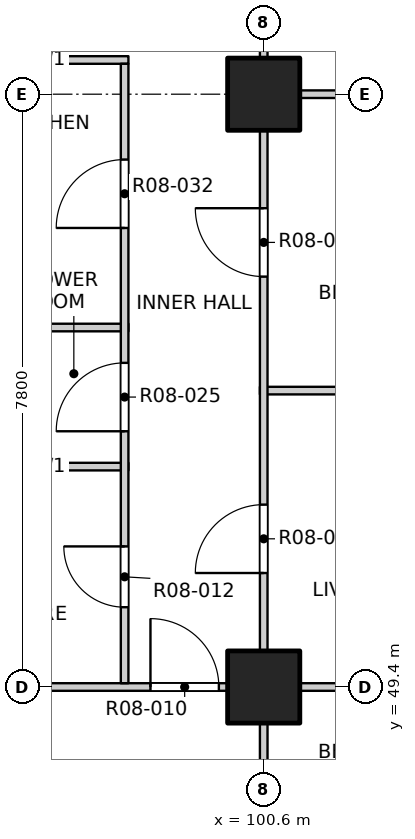
"""IFC4 building model, lengths in metres.
Left out: names, types, materials, properties, quantities, classifications, styles, units other than length and angle.
Written with IfcOpenShell. Run it as: python <this file> out.ifc"""

import sys

from ifc_helpers import new_model, si_unit, direction, frame, frame_2d, origin, origin_2d, place, context, subcontext, project, spatial, rectangle, extrude, element, fill, save


model = new_model("IFC4")
c1 = context("Model", 3, precision=1e-05, world=origin(), true_north=direction((0.0, 1.0)))
c2 = subcontext(c1, "Body", "Model", "MODEL_VIEW")
j1 = project(units=[si_unit("LENGTHUNIT", "METRE"), si_unit("PLANEANGLEUNIT", "RADIAN")], contexts=[c1])
p1 = place(None, origin())
s1 = spatial("IfcSite", under=j1, at=p1, CompositionType="ELEMENT")
p2 = place(p1, origin())
s2 = spatial("IfcBuilding", under=s1, at=p2, CompositionType="ELEMENT")
p3 = place(p2, frame((0.0, 0.0, 99.9)))
s3 = spatial("IfcBuildingStorey", under=s2, at=p3, CompositionType="ELEMENT", Elevation=99.9)
for number, where, z_axis, x_axis in (
    (1, (100.6, 49.4, -0.3), (0.0, 0.0, 1.0), (1.0, 0.0, 0.0)),
    (2, (100.6, 57.2, -0.3), (0.0, 0.0, 1.0), (1.0, 0.0, 0.0)),
):
    element("IfcColumn", number, at=place(p3, frame(where, z_axis=z_axis, x_axis=x_axis)), inside=s3, PredefinedType="COLUMN", context=c2, shape_type="SweptSolid", body=[
        extrude(rectangle(XDim=0.95, YDim=0.95, at=origin_2d()), origin(), (0.0, 0.0, 1.0), 3.45),
    ])
p4 = place(p3, frame((65.8, 49.4, 0.0), z_axis=(0.0, 0.0, 1.0), x_axis=(1.0, 0.0, 0.0)))
e3 = element("IfcWall", 3, at=p4, inside=s3, PredefinedType="PARTITIONING", context=c2, shape_type="SweptSolid", body=[
    extrude(rectangle(XDim=38.4, YDim=0.1, at=frame_2d((19.2, 0.0))), origin(), (0.0, 0.0, 1.0), 3.15),
])
p5 = place(p4, frame((4.19, 0.0, 0.0)))
e4 = element("IfcOpeningElement", 4, at=p5, cuts=e3, PredefinedType="OPENING", context=c2, shape_type="SweptSolid", body=[
    extrude(rectangle(XDim=0.9, YDim=2.1, at=frame_2d((0.45, 1.05))), frame((0.0, 0.06, 0.0), z_axis=(0.0, -1.0, 0.0), x_axis=(1.0, 0.0, 0.0)), (0.0, 0.0, 1.0), 0.12),
])
p6 = place(p4, frame((9.0, 0.0, 0.0)))
e5 = element("IfcOpeningElement", 5, at=p6, cuts=e3, PredefinedType="OPENING", context=c2, shape_type="SweptSolid", body=[
    extrude(rectangle(XDim=0.9, YDim=2.1, at=frame_2d((0.45, 1.05))), frame((0.0, 0.06, 0.0), z_axis=(0.0, -1.0, 0.0), x_axis=(1.0, 0.0, 0.0)), (0.0, 0.0, 1.0), 0.12),
])
p7 = place(p4, frame((12.9, 0.0, 0.0)))
e6 = element("IfcOpeningElement", 6, at=p7, cuts=e3, PredefinedType="OPENING", context=c2, shape_type="SweptSolid", body=[
    extrude(rectangle(XDim=0.9, YDim=2.1, at=frame_2d((0.45, 1.05))), frame((0.0, 0.06, 0.0), z_axis=(0.0, -1.0, 0.0), x_axis=(1.0, 0.0, 0.0)), (0.0, 0.0, 1.0), 0.12),
])
p8 = place(p4, frame((16.8, 0.0, 0.0)))
e7 = element("IfcOpeningElement", 7, at=p8, cuts=e3, PredefinedType="OPENING", context=c2, shape_type="SweptSolid", body=[
    extrude(rectangle(XDim=0.9, YDim=2.1, at=frame_2d((0.45, 1.05))), frame((0.0, 0.06, 0.0), z_axis=(0.0, -1.0, 0.0), x_axis=(1.0, 0.0, 0.0)), (0.0, 0.0, 1.0), 0.12),
])
p9 = place(p4, frame((20.7, 0.0, 0.0)))
e8 = element("IfcOpeningElement", 8, at=p9, cuts=e3, PredefinedType="OPENING", context=c2, shape_type="SweptSolid", body=[
    extrude(rectangle(XDim=0.9, YDim=2.1, at=frame_2d((0.45, 1.05))), frame((0.0, 0.06, 0.0), z_axis=(0.0, -1.0, 0.0), x_axis=(1.0, 0.0, 0.0)), (0.0, 0.0, 1.0), 0.12),
])
p10 = place(p4, frame((24.6, 0.0, 0.0)))
e9 = element("IfcOpeningElement", 9, at=p10, cuts=e3, PredefinedType="OPENING", context=c2, shape_type="SweptSolid", body=[
    extrude(rectangle(XDim=0.9, YDim=2.1, at=frame_2d((0.45, 1.05))), frame((0.0, 0.06, 0.0), z_axis=(0.0, -1.0, 0.0), x_axis=(1.0, 0.0, 0.0)), (0.0, 0.0, 1.0), 0.12),
])
p11 = place(p4, frame((28.5, 0.0, 0.0)))
e10 = element("IfcOpeningElement", 10, at=p11, cuts=e3, PredefinedType="OPENING", context=c2, shape_type="SweptSolid", body=[
    extrude(rectangle(XDim=0.9, YDim=2.1, at=frame_2d((0.45, 1.05))), frame((0.0, 0.06, 0.0), z_axis=(0.0, -1.0, 0.0), x_axis=(1.0, 0.0, 0.0)), (0.0, 0.0, 1.0), 0.12),
])
p12 = place(p4, frame((33.31, 0.0, 0.0)))
e11 = element("IfcOpeningElement", 11, at=p12, cuts=e3, PredefinedType="OPENING", context=c2, shape_type="SweptSolid", body=[
    extrude(rectangle(XDim=0.9, YDim=2.1, at=frame_2d((0.45, 1.05))), frame((0.0, 0.06, 0.0), z_axis=(0.0, -1.0, 0.0), x_axis=(1.0, 0.0, 0.0)), (0.0, 0.0, 1.0), 0.12),
])
p13 = place(p3, frame((96.6, 52.3, 0.0), z_axis=(0.0, 0.0, 1.0), x_axis=(1.0, 0.0, 0.0)))
e12 = element("IfcWall", 12, at=p13, inside=s3, PredefinedType="PARTITIONING", context=c2, shape_type="SweptSolid", body=[
    extrude(rectangle(XDim=2.22, YDim=0.1, at=frame_2d((1.11, 0.0))), origin(), (0.0, 0.0, 1.0), 3.15),
])
p14 = place(p3, frame((100.55, 53.3, 0.0), z_axis=(0.0, 0.0, 1.0), x_axis=(1.0, 0.0, 0.0)))
e13 = element("IfcWall", 13, at=p14, inside=s3, PredefinedType="PARTITIONING", context=c2, shape_type="SweptSolid", body=[
    extrude(rectangle(XDim=3.65, YDim=0.1, at=frame_2d((1.825, 0.0))), origin(), (0.0, 0.0, 1.0), 3.15),
])
p15 = place(p3, frame((96.6, 54.13, 0.0), z_axis=(0.0, 0.0, 1.0), x_axis=(1.0, 0.0, 0.0)))
e14 = element("IfcWall", 14, at=p15, inside=s3, PredefinedType="PARTITIONING", context=c2, shape_type="SweptSolid", body=[
    extrude(rectangle(XDim=2.22, YDim=0.1, at=frame_2d((1.11, 0.0))), origin(), (0.0, 0.0, 1.0), 3.15),
])
p16 = place(p3, frame((100.55, 57.2, 0.0), z_axis=(0.0, 0.0, 1.0), x_axis=(1.0, 0.0, 0.0)))
e15 = element("IfcWall", 15, at=p16, inside=s3, PredefinedType="PARTITIONING", context=c2, shape_type="SweptSolid", body=[
    extrude(rectangle(XDim=3.65, YDim=0.1, at=frame_2d((1.825, 0.0))), origin(), (0.0, 0.0, 1.0), 3.15),
])
p17 = place(p3, frame((96.6, 57.65, 0.0), z_axis=(0.0, 0.0, 1.0), x_axis=(1.0, 0.0, 0.0)))
e16 = element("IfcWall", 16, at=p17, inside=s3, PredefinedType="PARTITIONING", context=c2, shape_type="SweptSolid", body=[
    extrude(rectangle(XDim=2.22, YDim=0.1, at=frame_2d((1.11, 0.0))), origin(), (0.0, 0.0, 1.0), 3.15),
])
p18 = place(p3, frame((98.77, 49.45, 0.0), z_axis=(0.0, 0.0, 1.0), x_axis=(0.0, 1.0, 0.0)))
e17 = element("IfcWall", 17, at=p18, inside=s3, PredefinedType="PARTITIONING", context=c2, shape_type="SweptSolid", body=[
    extrude(rectangle(XDim=8.15, YDim=0.1, at=frame_2d((4.075, 0.0))), origin(), (0.0, 0.0, 1.0), 3.15),
])
p19 = place(p18, frame((1.0, 0.0, 0.0)))
e18 = element("IfcOpeningElement", 18, at=p19, cuts=e17, PredefinedType="OPENING", context=c2, shape_type="SweptSolid", body=[
    extrude(rectangle(XDim=0.8, YDim=2.1, at=frame_2d((0.4, 1.05))), frame((0.0, 0.06, 0.0), z_axis=(0.0, -1.0, 0.0), x_axis=(1.0, 0.0, 0.0)), (0.0, 0.0, 1.0), 0.12),
])
p20 = place(p18, frame((3.315, 0.0, 0.0)))
e19 = element("IfcOpeningElement", 19, at=p20, cuts=e17, PredefinedType="OPENING", context=c2, shape_type="SweptSolid", body=[
    extrude(rectangle(XDim=0.9, YDim=2.1, at=frame_2d((0.45, 1.05))), frame((0.0, 0.06, 0.0), z_axis=(0.0, -1.0, 0.0), x_axis=(1.0, 0.0, 0.0)), (0.0, 0.0, 1.0), 0.12),
])
p21 = place(p18, frame((5.99, 0.0, 0.0)))
e20 = element("IfcOpeningElement", 20, at=p21, cuts=e17, PredefinedType="OPENING", context=c2, shape_type="SweptSolid", body=[
    extrude(rectangle(XDim=0.9, YDim=2.1, at=frame_2d((0.45, 1.05))), frame((0.0, 0.06, 0.0), z_axis=(0.0, -1.0, 0.0), x_axis=(1.0, 0.0, 0.0)), (0.0, 0.0, 1.0), 0.12),
])
p22 = place(p3, frame((100.6, 45.8, 0.0), z_axis=(0.0, 0.0, 1.0), x_axis=(0.0, 1.0, 0.0)))
e21 = element("IfcWall", 21, at=p22, inside=s3, PredefinedType="PARTITIONING", context=c2, shape_type="SweptSolid", body=[
    extrude(rectangle(XDim=38.4, YDim=0.1, at=frame_2d((19.2, 0.0))), origin(), (0.0, 0.0, 1.0), 3.15),
])
p23 = place(p22, frame((1.05, 0.0, 0.0)))
e22 = element("IfcOpeningElement", 22, at=p23, cuts=e21, PredefinedType="OPENING", context=c2, shape_type="SweptSolid", body=[
    extrude(rectangle(XDim=1.2, YDim=2.1, at=frame_2d((0.6, 1.05))), frame((0.0, 0.06, 0.0), z_axis=(0.0, -1.0, 0.0), x_axis=(1.0, 0.0, 0.0)), (0.0, 0.0, 1.0), 0.12),
])
p24 = place(p22, frame((5.1, 0.0, 0.0)))
e23 = element("IfcOpeningElement", 23, at=p24, cuts=e21, PredefinedType="OPENING", context=c2, shape_type="SweptSolid", body=[
    extrude(rectangle(XDim=0.9, YDim=2.1, at=frame_2d((0.45, 1.05))), frame((0.0, 0.06, 0.0), z_axis=(0.0, -1.0, 0.0), x_axis=(1.0, 0.0, 0.0)), (0.0, 0.0, 1.0), 0.12),
])
p25 = place(p22, frame((9.0, 0.0, 0.0)))
e24 = element("IfcOpeningElement", 24, at=p25, cuts=e21, PredefinedType="OPENING", context=c2, shape_type="SweptSolid", body=[
    extrude(rectangle(XDim=0.9, YDim=2.1, at=frame_2d((0.45, 1.05))), frame((0.0, 0.06, 0.0), z_axis=(0.0, -1.0, 0.0), x_axis=(1.0, 0.0, 0.0)), (0.0, 0.0, 1.0), 0.12),
])
p26 = place(p22, frame((12.9, 0.0, 0.0)))
e25 = element("IfcOpeningElement", 25, at=p26, cuts=e21, PredefinedType="OPENING", context=c2, shape_type="SweptSolid", body=[
    extrude(rectangle(XDim=0.9, YDim=2.1, at=frame_2d((0.45, 1.05))), frame((0.0, 0.06, 0.0), z_axis=(0.0, -1.0, 0.0), x_axis=(1.0, 0.0, 0.0)), (0.0, 0.0, 1.0), 0.12),
])
p27 = place(p22, frame((16.8, 0.0, 0.0)))
e26 = element("IfcOpeningElement", 26, at=p27, cuts=e21, PredefinedType="OPENING", context=c2, shape_type="SweptSolid", body=[
    extrude(rectangle(XDim=0.9, YDim=2.1, at=frame_2d((0.45, 1.05))), frame((0.0, 0.06, 0.0), z_axis=(0.0, -1.0, 0.0), x_axis=(1.0, 0.0, 0.0)), (0.0, 0.0, 1.0), 0.12),
])
p28 = place(p22, frame((20.7, 0.0, 0.0)))
e27 = element("IfcOpeningElement", 27, at=p28, cuts=e21, PredefinedType="OPENING", context=c2, shape_type="SweptSolid", body=[
    extrude(rectangle(XDim=0.9, YDim=2.1, at=frame_2d((0.45, 1.05))), frame((0.0, 0.06, 0.0), z_axis=(0.0, -1.0, 0.0), x_axis=(1.0, 0.0, 0.0)), (0.0, 0.0, 1.0), 0.12),
])
p29 = place(p22, frame((24.6, 0.0, 0.0)))
e28 = element("IfcOpeningElement", 28, at=p29, cuts=e21, PredefinedType="OPENING", context=c2, shape_type="SweptSolid", body=[
    extrude(rectangle(XDim=0.9, YDim=2.1, at=frame_2d((0.45, 1.05))), frame((0.0, 0.06, 0.0), z_axis=(0.0, -1.0, 0.0), x_axis=(1.0, 0.0, 0.0)), (0.0, 0.0, 1.0), 0.12),
])
p30 = place(p22, frame((28.5, 0.0, 0.0)))
e29 = element("IfcOpeningElement", 29, at=p30, cuts=e21, PredefinedType="OPENING", context=c2, shape_type="SweptSolid", body=[
    extrude(rectangle(XDim=0.9, YDim=2.1, at=frame_2d((0.45, 1.05))), frame((0.0, 0.06, 0.0), z_axis=(0.0, -1.0, 0.0), x_axis=(1.0, 0.0, 0.0)), (0.0, 0.0, 1.0), 0.12),
])
p31 = place(p22, frame((32.4, 0.0, 0.0)))
e30 = element("IfcOpeningElement", 30, at=p31, cuts=e21, PredefinedType="OPENING", context=c2, shape_type="SweptSolid", body=[
    extrude(rectangle(XDim=0.9, YDim=2.1, at=frame_2d((0.45, 1.05))), frame((0.0, 0.06, 0.0), z_axis=(0.0, -1.0, 0.0), x_axis=(1.0, 0.0, 0.0)), (0.0, 0.0, 1.0), 0.12),
])
p32 = place(p22, frame((36.15, 0.0, 0.0)))
e31 = element("IfcOpeningElement", 31, at=p32, cuts=e21, PredefinedType="OPENING", context=c2, shape_type="SweptSolid", body=[
    extrude(rectangle(XDim=1.2, YDim=2.1, at=frame_2d((0.6, 1.05))), frame((0.0, 0.06, 0.0), z_axis=(0.0, -1.0, 0.0), x_axis=(1.0, 0.0, 0.0)), (0.0, 0.0, 1.0), 0.12),
])
p33 = place(p12, origin())
e32 = element("IfcDoor", 32, at=p33, inside=s3, OperationType="SINGLE_SWING_LEFT", PredefinedType="DOOR", context=c2, shape_type="SweptSolid", body=[
    extrude(rectangle(XDim=0.9, YDim=2.1, at=frame_2d((0.45, 1.05))), frame((0.0, 0.025, 0.0), z_axis=(0.0, -1.0, 0.0), x_axis=(1.0, 0.0, 0.0)), (0.0, 0.0, 1.0), 0.05),
])
fill(e11, e32)
p34 = place(p19, origin())
e33 = element("IfcDoor", 33, at=p34, inside=s3, OperationType="SINGLE_SWING_RIGHT", PredefinedType="DOOR", context=c2, shape_type="SweptSolid", body=[
    extrude(rectangle(XDim=0.8, YDim=2.1, at=frame_2d((0.4, 1.05))), frame((0.0, 0.025, 0.0), z_axis=(0.0, -1.0, 0.0), x_axis=(1.0, 0.0, 0.0)), (0.0, 0.0, 1.0), 0.05),
])
fill(e18, e33)
p35 = place(p24, origin())
e34 = element("IfcDoor", 34, at=p35, inside=s3, OperationType="SINGLE_SWING_LEFT", PredefinedType="DOOR", context=c2, shape_type="SweptSolid", body=[
    extrude(rectangle(XDim=0.9, YDim=2.1, at=frame_2d((0.45, 1.05))), frame((0.0, 0.025, 0.0), z_axis=(0.0, -1.0, 0.0), x_axis=(1.0, 0.0, 0.0)), (0.0, 0.0, 1.0), 0.05),
])
fill(e23, e34)
p36 = place(p20, origin())
e35 = element("IfcDoor", 35, at=p36, inside=s3, OperationType="SINGLE_SWING_LEFT", PredefinedType="DOOR", context=c2, shape_type="SweptSolid", body=[
    extrude(rectangle(XDim=0.9, YDim=2.1, at=frame_2d((0.45, 1.05))), frame((0.0, 0.025, 0.0), z_axis=(0.0, -1.0, 0.0), x_axis=(1.0, 0.0, 0.0)), (0.0, 0.0, 1.0), 0.05),
])
fill(e19, e35)
p37 = place(p25, origin())
e36 = element("IfcDoor", 36, at=p37, inside=s3, OperationType="SINGLE_SWING_RIGHT", PredefinedType="DOOR", context=c2, shape_type="SweptSolid", body=[
    extrude(rectangle(XDim=0.9, YDim=2.1, at=frame_2d((0.45, 1.05))), frame((0.0, 0.025, 0.0), z_axis=(0.0, -1.0, 0.0), x_axis=(1.0, 0.0, 0.0)), (0.0, 0.0, 1.0), 0.05),
])
fill(e24, e36)
p38 = place(p21, origin())
e37 = element("IfcDoor", 37, at=p38, inside=s3, OperationType="SINGLE_SWING_LEFT", PredefinedType="DOOR", context=c2, shape_type="SweptSolid", body=[
    extrude(rectangle(XDim=0.9, YDim=2.1, at=frame_2d((0.45, 1.05))), frame((0.0, 0.025, 0.0), z_axis=(0.0, -1.0, 0.0), x_axis=(1.0, 0.0, 0.0)), (0.0, 0.0, 1.0), 0.05),
])
fill(e20, e37)
save(model, sys.argv[1])
